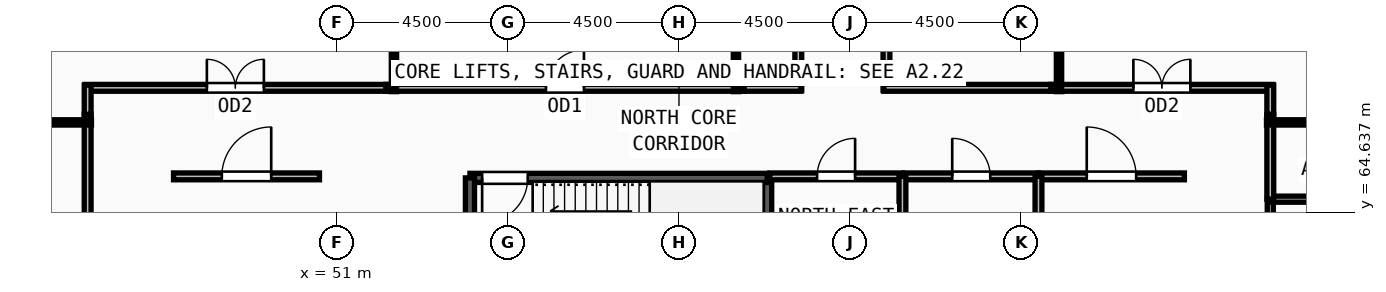
"""IFC4 building model, lengths in metres.
Left out: names, types, materials, properties, quantities, classifications, styles, units other than length and angle.
Written with IfcOpenShell. Run it as: python <this file> out.ifc"""

import sys

from ifc_helpers import new_model, si_unit, direction, frame, frame_2d, origin, place, context, subcontext, project, spatial, rectangle, extrude, source, transform, mapped, element, fill, save


model = new_model("IFC4")
c1 = context("Model", 3, precision=1e-05, world=origin(), true_north=direction((0.0, 1.0)))
c2 = subcontext(c1, "Body", "Model", "MODEL_VIEW")
j1 = project(units=[si_unit("LENGTHUNIT", "METRE"), si_unit("PLANEANGLEUNIT", "RADIAN")], contexts=[c1])
p1 = place(None, origin())
s1 = spatial("IfcSite", under=j1, at=p1, CompositionType="ELEMENT")
p2 = place(p1, origin())
s2 = spatial("IfcBuilding", under=s1, at=p2, CompositionType="ELEMENT")
p3 = place(p2, frame((0.0, 0.0, 224.25)))
s3 = spatial("IfcBuildingStorey", under=s2, at=p3, CompositionType="ELEMENT", Elevation=224.25)
p4 = place(p3, frame((62.32, 62.1, 0.0), z_axis=(0.0, 0.0, 1.0), x_axis=(0.0, 1.0, 0.0)))
e1 = element("IfcWall", 1, at=p4, inside=s3, PredefinedType="SOLIDWALL", context=c2, shape_type="SweptSolid", body=[
    extrude(rectangle(XDim=3.44, YDim=0.24, at=frame_2d((1.72, 0.0))), origin(), (0.0, 0.0, 1.0), 3.57),
])
p5 = place(p3, frame((62.32, 65.54, 0.0), z_axis=(0.0, 0.0, 1.0), x_axis=(-1.0, 0.0, 0.0)))
e2 = element("IfcWall", 2, at=p5, inside=s3, PredefinedType="SOLIDWALL", context=c2, shape_type="SweptSolid", body=[
    extrude(rectangle(XDim=7.82, YDim=0.24, at=frame_2d((3.91, 0.0))), origin(), (0.0, 0.0, 1.0), 3.57),
])
m1 = source(origin(), c2, "Body", "SweptSolid", [
    extrude(rectangle(XDim=1.2, YDim=2.2, at=frame_2d((0.6, 1.1))), frame((0.0, 0.13, 0.0), z_axis=(0.0, -1.0, 0.0), x_axis=(1.0, 0.0, 0.0)), (0.0, 0.0, 1.0), 0.26),
])
p6 = place(p5, frame((6.3, 0.0, 0.0)))
e3 = element("IfcOpeningElement", 3, at=p6, cuts=e2, PredefinedType="OPENING", context=c2, shape_type="MappedRepresentation", body=[
    mapped(m1, transform((0.0, 0.0, 0.0), x_axis=(1.0, 0.0, 0.0), y_axis=(0.0, 1.0, 0.0), z_axis=(0.0, 0.0, 1.0), scale=1.0)),
])
p7 = place(p3, frame((54.5, 65.54, 0.0), z_axis=(0.0, 0.0, 1.0), x_axis=(0.0, -1.0, 0.0)))
e4 = element("IfcWall", 4, at=p7, inside=s3, PredefinedType="SOLIDWALL", context=c2, shape_type="SweptSolid", body=[
    extrude(rectangle(XDim=3.44, YDim=0.24, at=frame_2d((1.72, 0.0))), origin(), (0.0, 0.0, 1.0), 3.57),
])
p8 = place(p3, frame((75.56, 62.24, 0.0), z_axis=(0.0, 0.0, 1.0), x_axis=(0.0, 1.0, 0.0)))
e5 = element("IfcWall", 5, at=p8, inside=s3, PredefinedType="PARTITIONING", context=c2, shape_type="SweptSolid", body=[
    extrude(rectangle(XDim=2.74, YDim=0.16, at=frame_2d((1.37, 0.0))), origin(), (0.0, 0.0, 1.0), 3.57),
])
m2 = source(origin(), c2, "Body", "SweptSolid", [
    extrude(rectangle(XDim=1.05, YDim=2.15, at=frame_2d((0.525, 1.075))), frame((0.0, 0.09, 0.0), z_axis=(0.0, -1.0, 0.0), x_axis=(1.0, 0.0, 0.0)), (0.0, 0.0, 1.0), 0.18),
])
p9 = place(p8, frame((0.845, 0.0, 0.0)))
e6 = element("IfcOpeningElement", 6, at=p9, cuts=e5, PredefinedType="OPENING", context=c2, shape_type="MappedRepresentation", body=[
    mapped(m2, transform((0.0, 0.0, 0.0), x_axis=(1.0, 0.0, 0.0), y_axis=(0.0, 1.0, 0.0), z_axis=(0.0, 0.0, 1.0), scale=1.0)),
])
p10 = place(p3, frame((62.39, 65.58, 0.0), z_axis=(0.0, 0.0, 1.0), x_axis=(1.0, 0.0, 0.0)))
e7 = element("IfcWall", 7, at=p10, inside=s3, PredefinedType="PARTITIONING", context=c2, shape_type="SweptSolid", body=[
    extrude(rectangle(XDim=3.49, YDim=0.18, at=frame_2d((1.745, 0.0))), origin(), (0.0, 0.0, 1.0), 3.57),
])
m3 = source(origin(), c2, "Body", "SweptSolid", [
    extrude(rectangle(XDim=1.0, YDim=2.2, at=frame_2d((0.5, 1.1))), frame((0.0, 0.1, 0.0), z_axis=(0.0, -1.0, 0.0), x_axis=(1.0, 0.0, 0.0)), (0.0, 0.0, 1.0), 0.2),
])
p11 = place(p10, frame((1.245, 0.0, 0.0)))
e8 = element("IfcOpeningElement", 8, at=p11, cuts=e7, PredefinedType="OPENING", context=c2, shape_type="MappedRepresentation", body=[
    mapped(m3, transform((0.0, 0.0, 0.0), x_axis=(1.0, 0.0, 0.0), y_axis=(0.0, 1.0, 0.0), z_axis=(0.0, 0.0, 1.0), scale=1.0)),
])
p12 = place(p3, frame((65.92, 65.58, 0.0), z_axis=(0.0, 0.0, 1.0), x_axis=(1.0, 0.0, 0.0)))
e9 = element("IfcWall", 9, at=p12, inside=s3, PredefinedType="PARTITIONING", context=c2, shape_type="SweptSolid", body=[
    extrude(rectangle(XDim=3.54, YDim=0.18, at=frame_2d((1.77, 0.0))), origin(), (0.0, 0.0, 1.0), 3.57),
])
p13 = place(p12, frame((1.27, 0.0, 0.0)))
e10 = element("IfcOpeningElement", 10, at=p13, cuts=e9, PredefinedType="OPENING", context=c2, shape_type="MappedRepresentation", body=[
    mapped(m3, transform((0.0, 0.0, 0.0), x_axis=(1.0, 0.0, 0.0), y_axis=(0.0, 1.0, 0.0), z_axis=(0.0, 0.0, 1.0), scale=1.0)),
])
p14 = place(p3, frame((46.7, 65.58, 0.0), z_axis=(0.0, 0.0, 1.0), x_axis=(1.0, 0.0, 0.0)))
e11 = element("IfcWall", 11, at=p14, inside=s3, PredefinedType="PARTITIONING", context=c2, shape_type="SweptSolid", body=[
    extrude(rectangle(XDim=3.84, YDim=0.18, at=frame_2d((1.92, 0.0))), origin(), (0.0, 0.0, 1.0), 3.57),
])
m4 = source(origin(), c2, "Body", "SweptSolid", [
    extrude(rectangle(XDim=1.3, YDim=2.2, at=frame_2d((0.65, 1.1))), frame((0.0, 0.1, 0.0), z_axis=(0.0, -1.0, 0.0), x_axis=(1.0, 0.0, 0.0)), (0.0, 0.0, 1.0), 0.2),
])
p15 = place(p14, frame((1.27, 0.0, 0.0)))
e12 = element("IfcOpeningElement", 12, at=p15, cuts=e11, PredefinedType="OPENING", context=c2, shape_type="MappedRepresentation", body=[
    mapped(m4, transform((0.0, 0.0, 0.0), x_axis=(1.0, 0.0, 0.0), y_axis=(0.0, 1.0, 0.0), z_axis=(0.0, 0.0, 1.0), scale=1.0)),
])
p16 = place(p3, frame((69.46, 65.58, 0.0), z_axis=(0.0, 0.0, 1.0), x_axis=(1.0, 0.0, 0.0)))
e13 = element("IfcWall", 13, at=p16, inside=s3, PredefinedType="PARTITIONING", context=c2, shape_type="SweptSolid", body=[
    extrude(rectangle(XDim=3.84, YDim=0.18, at=frame_2d((1.92, 0.0))), origin(), (0.0, 0.0, 1.0), 3.57),
])
p17 = place(p16, frame((1.27, 0.0, 0.0)))
e14 = element("IfcOpeningElement", 14, at=p17, cuts=e13, PredefinedType="OPENING", context=c2, shape_type="MappedRepresentation", body=[
    mapped(m4, transform((0.0, 0.0, 0.0), x_axis=(1.0, 0.0, 0.0), y_axis=(0.0, 1.0, 0.0), z_axis=(0.0, 0.0, 1.0), scale=1.0)),
])
p18 = place(p3, frame((69.785, 67.91, 0.0), z_axis=(0.0, 0.0, 1.0), x_axis=(1.0, 0.0, 0.0)))
e15 = element("IfcWall", 15, at=p18, inside=s3, PredefinedType="PARTITIONING", context=c2, shape_type="SweptSolid", body=[
    extrude(rectangle(XDim=5.845, YDim=0.18, at=frame_2d((2.922, 0.0))), origin(), (0.0, 0.0, 1.0), 3.57),
])
m5 = source(origin(), c2, "Body", "SweptSolid", [
    extrude(rectangle(XDim=1.5, YDim=2.2, at=frame_2d((0.75, 1.1))), frame((0.0, 0.1, 0.0), z_axis=(0.0, -1.0, 0.0), x_axis=(1.0, 0.0, 0.0)), (0.0, 0.0, 1.0), 0.2),
])
p19 = place(p18, frame((2.172, 0.0, 0.0)))
e16 = element("IfcOpeningElement", 16, at=p19, cuts=e15, PredefinedType="OPENING", context=c2, shape_type="MappedRepresentation", body=[
    mapped(m5, transform((0.0, 0.0, 0.0), x_axis=(1.0, 0.0, 0.0), y_axis=(0.0, 1.0, 0.0), z_axis=(0.0, 0.0, 1.0), scale=1.0)),
])
p20 = place(p3, frame((65.46, 78.413, 0.0), z_axis=(0.0, 0.0, 1.0), x_axis=(0.0, -1.0, 0.0)))
e17 = element("IfcWall", 17, at=p20, inside=s3, PredefinedType="PARTITIONING", context=c2, shape_type="SweptSolid", body=[
    extrude(rectangle(XDim=10.573, YDim=0.18, at=frame_2d((5.287, 0.0))), origin(), (0.0, 0.0, 1.0), 3.57),
])
p21 = place(p20, frame((4.786, 0.0, 0.0)))
e18 = element("IfcOpeningElement", 18, at=p21, cuts=e17, PredefinedType="OPENING", context=c2, shape_type="MappedRepresentation", body=[
    mapped(m3, transform((0.0, 0.0, 0.0), x_axis=(1.0, 0.0, 0.0), y_axis=(0.0, 1.0, 0.0), z_axis=(0.0, 0.0, 1.0), scale=1.0)),
])
p22 = place(p3, frame((63.14, 67.84, 0.0), z_axis=(0.0, 0.0, 1.0), x_axis=(0.0, 1.0, 0.0)))
e19 = element("IfcWall", 19, at=p22, inside=s3, PredefinedType="PARTITIONING", context=c2, shape_type="SweptSolid", body=[
    extrude(rectangle(XDim=10.747, YDim=0.18, at=frame_2d((5.374, 0.0))), origin(), (0.0, 0.0, 1.0), 3.57),
])
p23 = place(p22, frame((4.873, 0.0, 0.0)))
e20 = element("IfcOpeningElement", 20, at=p23, cuts=e19, PredefinedType="OPENING", context=c2, shape_type="MappedRepresentation", body=[
    mapped(m3, transform((0.0, 0.0, 0.0), x_axis=(1.0, 0.0, 0.0), y_axis=(0.0, 1.0, 0.0), z_axis=(0.0, 0.0, 1.0), scale=1.0)),
])
p24 = place(p3, frame((52.285, 67.91, 0.0), z_axis=(0.0, 0.0, 1.0), x_axis=(1.0, 0.0, 0.0)))
e21 = element("IfcWall", 21, at=p24, inside=s3, PredefinedType="PARTITIONING", context=c2, shape_type="SweptSolid", body=[
    extrude(rectangle(XDim=9.43, YDim=0.18, at=frame_2d((4.715, 0.0))), origin(), (0.0, 0.0, 1.0), 3.57),
])
p25 = place(p24, frame((4.215, 0.0, 0.0)))
e22 = element("IfcOpeningElement", 22, at=p25, cuts=e21, PredefinedType="OPENING", context=c2, shape_type="MappedRepresentation", body=[
    mapped(m3, transform((0.0, 0.0, 0.0), x_axis=(1.0, 0.0, 0.0), y_axis=(0.0, 1.0, 0.0), z_axis=(0.0, 0.0, 1.0), scale=1.0)),
])
p26 = place(p3, frame((44.37, 67.91, 0.0), z_axis=(0.0, 0.0, 1.0), x_axis=(1.0, 0.0, 0.0)))
e23 = element("IfcWall", 23, at=p26, inside=s3, PredefinedType="PARTITIONING", context=c2, shape_type="SweptSolid", body=[
    extrude(rectangle(XDim=7.915, YDim=0.18, at=frame_2d((3.958, 0.0))), origin(), (0.0, 0.0, 1.0), 3.205),
])
p27 = place(p26, frame((3.207, 0.0, 0.0)))
e24 = element("IfcOpeningElement", 24, at=p27, cuts=e23, PredefinedType="OPENING", context=c2, shape_type="MappedRepresentation", body=[
    mapped(m5, transform((0.0, 0.0, 0.0), x_axis=(1.0, 0.0, 0.0), y_axis=(0.0, 1.0, 0.0), z_axis=(0.0, 0.0, 1.0), scale=1.0)),
])
p28 = place(p3, frame((44.44, 57.285, 0.0), z_axis=(0.0, 0.0, 1.0), x_axis=(0.0, 1.0, 0.0)))
e25 = element("IfcWall", 25, at=p28, inside=s3, PredefinedType="PARTITIONING", context=c2, shape_type="SweptSolid", body=[
    extrude(rectangle(XDim=9.93, YDim=0.18, at=frame_2d((4.965, 0.0))), origin(), (0.0, 0.0, 1.0), 3.57),
])
p29 = place(p28, frame((4.215, 0.0, 0.0)))
e26 = element("IfcOpeningElement", 26, at=p29, cuts=e25, PredefinedType="OPENING", context=c2, shape_type="MappedRepresentation", body=[
    mapped(m5, transform((0.0, 0.0, 0.0), x_axis=(1.0, 0.0, 0.0), y_axis=(0.0, 1.0, 0.0), z_axis=(0.0, 0.0, 1.0), scale=1.0)),
])
p30 = place(p3, frame((75.56, 64.98, 0.0), z_axis=(0.0, 0.0, 1.0), x_axis=(1.0, 0.0, 0.0)))
e27 = element("IfcWall", 27, at=p30, inside=s3, PredefinedType="PARTITIONING", context=c2, shape_type="SweptSolid", body=[
    extrude(rectangle(XDim=4.46, YDim=0.16, at=frame_2d((2.23, 0.0))), origin(), (0.0, 0.0, 1.0), 3.57),
])
p31 = place(p3, frame((65.88, 61.825, 0.0), z_axis=(0.0, 0.0, 1.0), x_axis=(0.0, 1.0, 0.0)))
e28 = element("IfcWall", 28, at=p31, inside=s3, PredefinedType="PARTITIONING", context=c2, shape_type="SweptSolid", body=[
    extrude(rectangle(XDim=3.755, YDim=0.18, at=frame_2d((1.877, 0.0))), origin(), (0.0, 0.0, 1.0), 3.57),
])
p32 = place(p3, frame((69.46, 61.95, 0.0), z_axis=(0.0, 0.0, 1.0), x_axis=(0.0, 1.0, 0.0)))
e29 = element("IfcWall", 29, at=p32, inside=s3, PredefinedType="PARTITIONING", context=c2, shape_type="SweptSolid", body=[
    extrude(rectangle(XDim=3.63, YDim=0.18, at=frame_2d((1.815, 0.0))), origin(), (0.0, 0.0, 1.0), 3.57),
])
p33 = place(p3, frame((75.56, 67.215, 0.0), z_axis=(0.0, 0.0, 1.0), x_axis=(0.0, -1.0, 0.0)))
e30 = element("IfcWall", 30, at=p33, inside=s3, PredefinedType="PARTITIONING", context=c2, shape_type="SweptSolid", body=[
    extrude(rectangle(XDim=2.235, YDim=0.18, at=frame_2d((1.118, 0.0))), origin(), (0.0, 0.0, 1.0), 3.57),
])
p34 = place(p3, frame((75.56, 67.98, 0.0), z_axis=(0.0, 0.0, 1.0), x_axis=(0.0, -1.0, 0.0)))
e31 = element("IfcWall", 31, at=p34, inside=s3, PredefinedType="PARTITIONING", context=c2, shape_type="SweptSolid", body=[
    extrude(rectangle(XDim=0.765, YDim=0.18, at=frame_2d((0.382, 0.0))), origin(), (0.0, 0.0, 1.0), 3.57),
])
p35 = place(p3, frame((65.39, 67.91, 0.0), z_axis=(0.0, 0.0, 1.0), x_axis=(1.0, 0.0, 0.0)))
e32 = element("IfcWall", 32, at=p35, inside=s3, PredefinedType="PARTITIONING", context=c2, shape_type="SweptSolid", body=[
    extrude(rectangle(XDim=4.395, YDim=0.18, at=frame_2d((2.198, 0.0))), origin(), (0.0, 0.0, 1.0), 3.57),
])
p36 = place(p3, frame((61.715, 67.91, 0.0), z_axis=(0.0, 0.0, 1.0), x_axis=(1.0, 0.0, 0.0)))
e33 = element("IfcWall", 33, at=p36, inside=s3, PredefinedType="PARTITIONING", context=c2, shape_type="SweptSolid", body=[
    extrude(rectangle(XDim=1.495, YDim=0.18, at=frame_2d((0.748, 0.0))), origin(), (0.0, 0.0, 1.0), 3.57),
])
p37 = place(p3, frame((44.44, 67.215, 0.0), z_axis=(0.0, 0.0, 1.0), x_axis=(0.0, 1.0, 0.0)))
e34 = element("IfcWall", 34, at=p37, inside=s3, PredefinedType="PARTITIONING", context=c2, shape_type="SweptSolid", body=[
    extrude(rectangle(XDim=0.765, YDim=0.18, at=frame_2d((0.382, 0.0))), origin(), (0.0, 0.0, 1.0), 3.57),
])
for number, where, z_axis, x_axis in (
    (35, (44.54, 67.0, 0.0), (0.0, 0.0, 1.0), (-1.0, 0.0, 0.0)),
    (36, (75.46, 67.0, 0.0), (0.0, 0.0, 1.0), (1.0, 0.0, 0.0)),
):
    element("IfcWall", number, at=place(p3, frame(where, z_axis=z_axis, x_axis=x_axis)), inside=s3, PredefinedType="PARTITIONING", context=c2, shape_type="SweptSolid", body=[
        extrude(rectangle(XDim=18.314, YDim=0.14, at=frame_2d((9.157, 0.0))), origin(), (0.0, 0.0, 1.0), 3.57),
    ])
p38 = place(p3, frame((52.5, 67.81, 0.0), z_axis=(0.0, 0.0, 1.0), x_axis=(0.0, 1.0, 0.0)))
e37 = element("IfcWall", 37, at=p38, inside=s3, PredefinedType="PARTITIONING", context=c2, shape_type="SweptSolid", body=[
    extrude(rectangle(XDim=10.283, YDim=0.14, at=frame_2d((5.142, 0.0))), origin(), (0.0, 0.0, 1.0), 3.57),
])
p39 = place(p3, frame((61.5, 67.81, 0.0), z_axis=(0.0, 0.0, 1.0), x_axis=(0.0, 1.0, 0.0)))
e38 = element("IfcWall", 38, at=p39, inside=s3, PredefinedType="PARTITIONING", context=c2, shape_type="SweptSolid", body=[
    extrude(rectangle(XDim=10.847, YDim=0.14, at=frame_2d((5.423, 0.0))), origin(), (0.0, 0.0, 1.0), 3.57),
])
p40 = place(p3, frame((70.0, 67.81, 0.0), z_axis=(0.0, 0.0, 1.0), x_axis=(0.0, 1.0, 0.0)))
e39 = element("IfcWall", 39, at=p40, inside=s3, PredefinedType="PARTITIONING", context=c2, shape_type="SweptSolid", body=[
    extrude(rectangle(XDim=10.353, YDim=0.14, at=frame_2d((5.177, 0.0))), origin(), (0.0, 0.0, 1.0), 3.57),
])
m6 = source(origin(), c2, "Body", "SweptSolid", [
    extrude(rectangle(XDim=1.2, YDim=2.2, at=frame_2d((0.6, 1.1))), frame((0.0, 0.025, 0.0), z_axis=(0.0, -1.0, 0.0), x_axis=(1.0, 0.0, 0.0)), (0.0, 0.0, 1.0), 0.05),
])
p41 = place(p6, origin())
e40 = element("IfcDoor", 40, at=p41, inside=s3, OperationType="SINGLE_SWING_RIGHT", PredefinedType="DOOR", context=c2, shape_type="MappedRepresentation", body=[
    mapped(m6, transform((0.0, 0.0, 0.0), x_axis=(1.0, 0.0, 0.0), y_axis=(0.0, 1.0, 0.0), z_axis=(0.0, 0.0, 1.0), scale=1.0)),
])
fill(e3, e40)
m7 = source(origin(), c2, "Body", "SweptSolid", [
    extrude(rectangle(XDim=1.0, YDim=2.2, at=frame_2d((0.5, 1.1))), frame((0.0, 0.025, 0.0), z_axis=(0.0, -1.0, 0.0), x_axis=(1.0, 0.0, 0.0)), (0.0, 0.0, 1.0), 0.05),
])
p42 = place(p11, origin())
e41 = element("IfcDoor", 41, at=p42, inside=s3, OperationType="SINGLE_SWING_RIGHT", PredefinedType="DOOR", context=c2, shape_type="MappedRepresentation", body=[
    mapped(m7, transform((0.0, 0.0, 0.0), x_axis=(1.0, 0.0, 0.0), y_axis=(0.0, 1.0, 0.0), z_axis=(0.0, 0.0, 1.0), scale=1.0)),
])
fill(e8, e41)
p43 = place(p13, origin())
e42 = element("IfcDoor", 42, at=p43, inside=s3, OperationType="SINGLE_SWING_LEFT", PredefinedType="DOOR", context=c2, shape_type="MappedRepresentation", body=[
    mapped(m7, transform((0.0, 0.0, 0.0), x_axis=(1.0, 0.0, 0.0), y_axis=(0.0, 1.0, 0.0), z_axis=(0.0, 0.0, 1.0), scale=1.0)),
])
fill(e10, e42)
m8 = source(origin(), c2, "Body", "SweptSolid", [
    extrude(rectangle(XDim=1.3, YDim=2.2, at=frame_2d((0.65, 1.1))), frame((0.0, 0.025, 0.0), z_axis=(0.0, -1.0, 0.0), x_axis=(1.0, 0.0, 0.0)), (0.0, 0.0, 1.0), 0.05),
])
p44 = place(p15, origin())
e43 = element("IfcDoor", 43, at=p44, inside=s3, OperationType="SINGLE_SWING_RIGHT", PredefinedType="DOOR", context=c2, shape_type="MappedRepresentation", body=[
    mapped(m8, transform((0.0, 0.0, 0.0), x_axis=(1.0, 0.0, 0.0), y_axis=(0.0, 1.0, 0.0), z_axis=(0.0, 0.0, 1.0), scale=1.0)),
])
fill(e12, e43)
p45 = place(p17, origin())
e44 = element("IfcDoor", 44, at=p45, inside=s3, OperationType="SINGLE_SWING_LEFT", PredefinedType="DOOR", context=c2, shape_type="MappedRepresentation", body=[
    mapped(m8, transform((0.0, 0.0, 0.0), x_axis=(1.0, 0.0, 0.0), y_axis=(0.0, 1.0, 0.0), z_axis=(0.0, 0.0, 1.0), scale=1.0)),
])
fill(e14, e44)
m9 = source(origin(), c2, "Body", "SweptSolid", [
    extrude(rectangle(XDim=1.5, YDim=2.2, at=frame_2d((0.75, 1.1))), frame((0.0, 0.025, 0.0), z_axis=(0.0, -1.0, 0.0), x_axis=(1.0, 0.0, 0.0)), (0.0, 0.0, 1.0), 0.05),
])
p46 = place(p19, origin())
e45 = element("IfcDoor", 45, at=p46, inside=s3, OperationType="DOUBLE_DOOR_SINGLE_SWING", PredefinedType="DOOR", context=c2, shape_type="MappedRepresentation", body=[
    mapped(m9, transform((0.0, 0.0, 0.0), x_axis=(1.0, 0.0, 0.0), y_axis=(0.0, 1.0, 0.0), z_axis=(0.0, 0.0, 1.0), scale=1.0)),
])
fill(e16, e45)
p47 = place(p25, origin())
e46 = element("IfcDoor", 46, at=p47, inside=s3, OperationType="SINGLE_SWING_RIGHT", PredefinedType="DOOR", context=c2, shape_type="MappedRepresentation", body=[
    mapped(m7, transform((0.0, 0.0, 0.0), x_axis=(1.0, 0.0, 0.0), y_axis=(0.0, 1.0, 0.0), z_axis=(0.0, 0.0, 1.0), scale=1.0)),
])
fill(e22, e46)
p48 = place(p27, origin())
e47 = element("IfcDoor", 47, at=p48, inside=s3, OperationType="DOUBLE_DOOR_SINGLE_SWING", PredefinedType="DOOR", context=c2, shape_type="MappedRepresentation", body=[
    mapped(m9, transform((0.0, 0.0, 0.0), x_axis=(1.0, 0.0, 0.0), y_axis=(0.0, 1.0, 0.0), z_axis=(0.0, 0.0, 1.0), scale=1.0)),
])
fill(e24, e47)
save(model, sys.argv[1])
